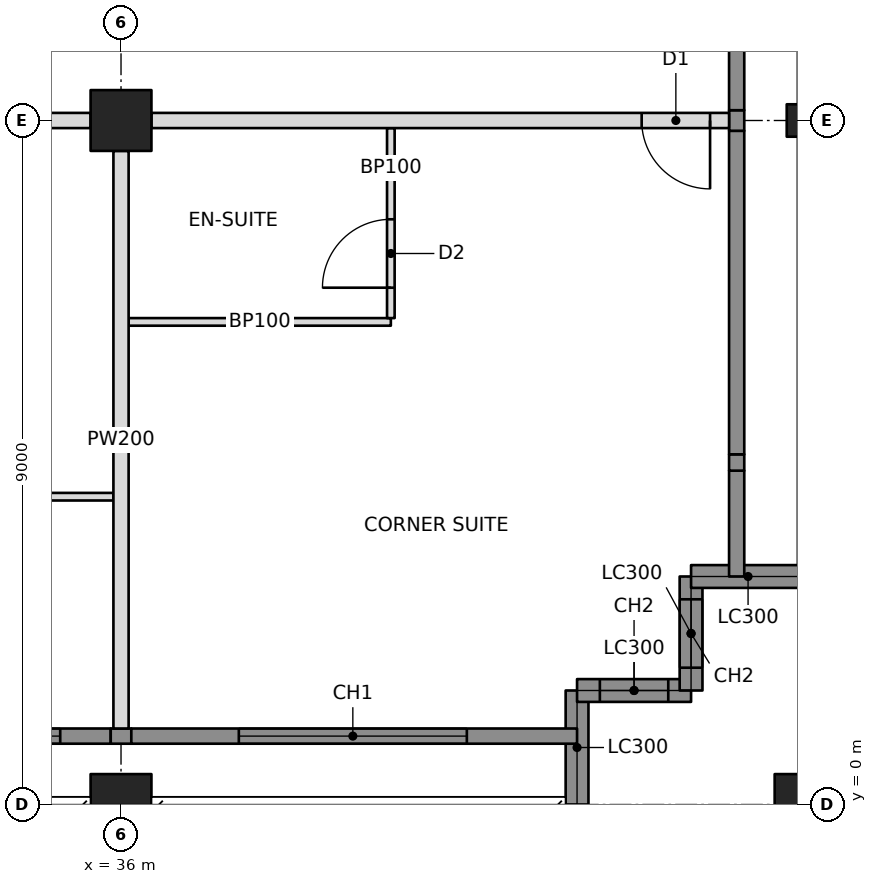
"""IFC4 building model, lengths in metres.
Left out: names, types, materials, properties, quantities, classifications, styles, units other than length and angle.
Written with IfcOpenShell. Run it as: python <this file> out.ifc"""

import sys

from ifc_helpers import new_model, si_unit, direction, frame, frame_2d, origin, origin_2d, place, context, subcontext, project, spatial, rectangle, hollow_rectangle, i_section, extrude, element, fill, save


model = new_model("IFC4")
c1 = context("Model", 3, precision=1e-05, world=origin(), true_north=direction((0.0, 1.0)))
c2 = subcontext(c1, "Body", "Model", "MODEL_VIEW")
j1 = project(units=[si_unit("LENGTHUNIT", "METRE"), si_unit("PLANEANGLEUNIT", "RADIAN")], contexts=[c1])
p1 = place(None, origin())
s1 = spatial("IfcSite", under=j1, at=p1, CompositionType="ELEMENT")
p2 = place(p1, origin())
s2 = spatial("IfcBuilding", under=s1, at=p2, CompositionType="ELEMENT")
p3 = place(p2, frame((0.0, 0.0, 201.2)))
s3 = spatial("IfcBuildingStorey", under=s2, at=p3, CompositionType="ELEMENT", Elevation=201.2)
p4 = place(p3, frame((36.0, 0.0, 0.0), z_axis=(0.0, 0.0, 1.0), x_axis=(1.0, 0.0, 0.0)))
e1 = element("IfcColumn", 1, at=p4, inside=s3, PredefinedType="COLUMN", context=c2, shape_type="SweptSolid", body=[
    extrude(hollow_rectangle(XDim=0.8, YDim=0.8, WallThickness=0.06, at=origin_2d()), origin(), (0.0, 0.0, 1.0), 3.4),
])
p5 = place(p3, frame((36.0, 9.0, 0.0), z_axis=(0.0, 0.0, 1.0), x_axis=(0.0, 1.0, 0.0)))
e2 = element("IfcColumn", 2, at=p5, inside=s3, PredefinedType="COLUMN", context=c2, shape_type="SweptSolid", body=[
    extrude(hollow_rectangle(XDim=0.8, YDim=0.8, WallThickness=0.05, at=origin_2d()), origin(), (0.0, 0.0, 1.0), 3.4),
])
p6 = place(p3, frame((45.0, 0.0, 0.0), z_axis=(0.0, 0.0, 1.0), x_axis=(1.0, 0.0, 0.0)))
e3 = element("IfcColumn", 3, at=p6, inside=s3, PredefinedType="COLUMN", context=c2, shape_type="SweptSolid", body=[
    extrude(hollow_rectangle(XDim=0.8, YDim=0.8, WallThickness=0.06, at=origin_2d()), origin(), (0.0, 0.0, 1.0), 3.4),
])
p7 = place(p3, frame((45.0, 9.0, 0.0), z_axis=(0.0, 0.0, 1.0), x_axis=(0.0, 1.0, 0.0)))
e4 = element("IfcColumn", 4, at=p7, inside=s3, PredefinedType="COLUMN", context=c2, shape_type="SweptSolid", body=[
    extrude(i_section(OverallWidth=0.427, OverallDepth=0.483, WebThickness=0.051, FlangeThickness=0.082, at=origin_2d()), origin(), (0.0, 0.0, 1.0), 3.4),
])
p8 = place(p3, frame((42.0, 0.0, 0.0), z_axis=(0.0, 0.0, 1.0), x_axis=(0.0, 1.0, 0.0)))
e5 = element("IfcWall", 5, at=p8, inside=s3, PredefinedType="SOLIDWALL", context=c2, shape_type="SweptSolid", body=[
    extrude(rectangle(XDim=1.5, YDim=0.3, at=frame_2d((0.75, 0.0))), origin(), (0.0, 0.0, 1.0), 2.42),
])
p9 = place(p3, frame((42.0, 1.5, 0.0), z_axis=(0.0, 0.0, 1.0), x_axis=(1.0, 0.0, 0.0)))
e6 = element("IfcWall", 6, at=p9, inside=s3, PredefinedType="SOLIDWALL", context=c2, shape_type="SweptSolid", body=[
    extrude(rectangle(XDim=1.5, YDim=0.3, at=frame_2d((0.75, 0.0))), origin(), (0.0, 0.0, 1.0), 3.2),
])
p10 = place(p9, frame((0.3, 0.0, 0.6)))
e7 = element("IfcOpeningElement", 7, at=p10, cuts=e6, PredefinedType="OPENING", context=c2, shape_type="SweptSolid", body=[
    extrude(rectangle(XDim=0.9, YDim=2.2, at=frame_2d((0.45, 1.1))), frame((0.0, 0.16, 0.0), z_axis=(0.0, -1.0, 0.0), x_axis=(1.0, 0.0, 0.0)), (0.0, 0.0, 1.0), 0.32),
])
p11 = place(p3, frame((43.5, 1.5, 0.0), z_axis=(0.0, 0.0, 1.0), x_axis=(0.0, 1.0, 0.0)))
e8 = element("IfcWall", 8, at=p11, inside=s3, PredefinedType="SOLIDWALL", context=c2, shape_type="SweptSolid", body=[
    extrude(rectangle(XDim=1.5, YDim=0.3, at=frame_2d((0.75, 0.0))), origin(), (0.0, 0.0, 1.0), 3.2),
])
p12 = place(p11, frame((0.3, 0.0, 0.6)))
e9 = element("IfcOpeningElement", 9, at=p12, cuts=e8, PredefinedType="OPENING", context=c2, shape_type="SweptSolid", body=[
    extrude(rectangle(XDim=0.9, YDim=2.2, at=frame_2d((0.45, 1.1))), frame((0.0, 0.16, 0.0), z_axis=(0.0, -1.0, 0.0), x_axis=(1.0, 0.0, 0.0)), (0.0, 0.0, 1.0), 0.32),
])
p13 = place(p3, frame((43.5, 3.0, 0.0), z_axis=(0.0, 0.0, 1.0), x_axis=(1.0, 0.0, 0.0)))
e10 = element("IfcWall", 10, at=p13, inside=s3, PredefinedType="SOLIDWALL", context=c2, shape_type="SweptSolid", body=[
    extrude(rectangle(XDim=1.5, YDim=0.3, at=frame_2d((0.75, 0.0))), origin(), (0.0, 0.0, 1.0), 2.42),
])
p14 = place(p3, frame((44.1, 3.0, 0.0), z_axis=(0.0, 0.0, 1.0), x_axis=(0.0, 1.0, 0.0)))
e11 = element("IfcWall", 11, at=p14, inside=s3, PredefinedType="SOLIDWALL", context=c2, shape_type="SweptSolid", body=[
    extrude(rectangle(XDim=1.393, YDim=0.2, at=frame_2d((0.696, 0.0))), origin(), (0.0, 0.0, 1.0), 3.2),
])
p15 = place(p3, frame((27.4, 9.0, 0.0), z_axis=(0.0, 0.0, 1.0), x_axis=(1.0, 0.0, 0.0)))
e12 = element("IfcWall", 12, at=p15, inside=s3, PredefinedType="PARTITIONING", context=c2, shape_type="SweptSolid", body=[
    extrude(rectangle(XDim=8.2, YDim=0.2, at=frame_2d((4.1, 0.0))), origin(), (0.0, 0.0, 1.0), 2.405),
])
p16 = place(p15, frame((0.15, 0.0, 0.0)))
e13 = element("IfcOpeningElement", 13, at=p16, cuts=e12, PredefinedType="OPENING", context=c2, shape_type="SweptSolid", body=[
    extrude(rectangle(XDim=0.9, YDim=2.1, at=frame_2d((0.45, 1.05))), frame((0.0, 0.11, 0.0), z_axis=(0.0, -1.0, 0.0), x_axis=(1.0, 0.0, 0.0)), (0.0, 0.0, 1.0), 0.22),
])
p17 = place(p3, frame((36.4, 9.0, 0.0), z_axis=(0.0, 0.0, 1.0), x_axis=(1.0, 0.0, 0.0)))
e14 = element("IfcWall", 14, at=p17, inside=s3, PredefinedType="PARTITIONING", context=c2, shape_type="SweptSolid", body=[
    extrude(rectangle(XDim=7.6, YDim=0.2, at=frame_2d((3.8, 0.0))), origin(), (0.0, 0.0, 1.0), 2.438),
])
p18 = place(p17, frame((6.45, 0.0, 0.0)))
e15 = element("IfcOpeningElement", 15, at=p18, cuts=e14, PredefinedType="OPENING", context=c2, shape_type="SweptSolid", body=[
    extrude(rectangle(XDim=0.9, YDim=2.1, at=frame_2d((0.45, 1.05))), frame((0.0, 0.11, 0.0), z_axis=(0.0, -1.0, 0.0), x_axis=(1.0, 0.0, 0.0)), (0.0, 0.0, 1.0), 0.22),
])
p19 = place(p3, frame((36.0, 8.6, 0.0), z_axis=(0.0, 0.0, 1.0), x_axis=(0.0, -1.0, 0.0)))
e16 = element("IfcWall", 16, at=p19, inside=s3, PredefinedType="PARTITIONING", context=c2, shape_type="SweptSolid", body=[
    extrude(rectangle(XDim=7.6, YDim=0.2, at=frame_2d((3.8, 0.0))), origin(), (0.0, 0.0, 1.0), 2.438),
])
p20 = place(p3, frame((31.5, 4.05, 0.0), z_axis=(0.0, 0.0, 1.0), x_axis=(1.0, 0.0, 0.0)))
e17 = element("IfcWall", 17, at=p20, inside=s3, PredefinedType="PARTITIONING", context=c2, shape_type="SweptSolid", body=[
    extrude(rectangle(XDim=4.4, YDim=0.1, at=frame_2d((2.2, 0.0))), origin(), (0.0, 0.0, 1.0), 2.438),
])
p21 = place(p20, frame((0.5, 0.0, 0.0)))
e18 = element("IfcOpeningElement", 18, at=p21, cuts=e17, PredefinedType="OPENING", context=c2, shape_type="SweptSolid", body=[
    extrude(rectangle(XDim=0.9, YDim=2.1, at=frame_2d((0.45, 1.05))), frame((0.0, 0.06, 0.0), z_axis=(0.0, -1.0, 0.0), x_axis=(1.0, 0.0, 0.0)), (0.0, 0.0, 1.0), 0.12),
])
p22 = place(p3, frame((36.1, 6.35, 0.0), z_axis=(0.0, 0.0, 1.0), x_axis=(1.0, 0.0, 0.0)))
e19 = element("IfcWall", 19, at=p22, inside=s3, PredefinedType="PARTITIONING", context=c2, shape_type="SweptSolid", body=[
    extrude(rectangle(XDim=3.45, YDim=0.1, at=frame_2d((1.725, 0.0))), origin(), (0.0, 0.0, 1.0), 2.438),
])
p23 = place(p3, frame((39.55, 8.9, 0.0), z_axis=(0.0, 0.0, 1.0), x_axis=(0.0, -1.0, 0.0)))
e20 = element("IfcWall", 20, at=p23, inside=s3, PredefinedType="PARTITIONING", context=c2, shape_type="SweptSolid", body=[
    extrude(rectangle(XDim=2.5, YDim=0.1, at=frame_2d((1.25, 0.0))), origin(), (0.0, 0.0, 1.0), 2.438),
])
p24 = place(p23, frame((1.2, 0.0, 0.0)))
e21 = element("IfcOpeningElement", 21, at=p24, cuts=e20, PredefinedType="OPENING", context=c2, shape_type="SweptSolid", body=[
    extrude(rectangle(XDim=0.9, YDim=2.1, at=frame_2d((0.45, 1.05))), frame((0.0, 0.06, 0.0), z_axis=(0.0, -1.0, 0.0), x_axis=(1.0, 0.0, 0.0)), (0.0, 0.0, 1.0), 0.12),
])
p25 = place(p3, frame((27.194, 0.9, 0.0), z_axis=(0.0, 0.0, 1.0), x_axis=(1.0, 0.0, 0.0)))
e22 = element("IfcWall", 22, at=p25, inside=s3, PredefinedType="SOLIDWALL", context=c2, shape_type="SweptSolid", body=[
    extrude(rectangle(XDim=8.671, YDim=0.2, at=frame_2d((4.335, 0.0))), origin(), (0.0, 0.0, 1.0), 3.2),
])
p26 = place(p25, frame((0.606, 0.0, 0.6)))
e23 = element("IfcOpeningElement", 23, at=p26, cuts=e22, PredefinedType="OPENING", context=c2, shape_type="SweptSolid", body=[
    extrude(rectangle(XDim=3.0, YDim=2.2, at=frame_2d((1.5, 1.1))), frame((0.0, 0.11, 0.0), z_axis=(0.0, -1.0, 0.0), x_axis=(1.0, 0.0, 0.0)), (0.0, 0.0, 1.0), 0.22),
])
p27 = place(p25, frame((5.006, 0.0, 0.6)))
e24 = element("IfcOpeningElement", 24, at=p27, cuts=e22, PredefinedType="OPENING", context=c2, shape_type="SweptSolid", body=[
    extrude(rectangle(XDim=3.0, YDim=2.2, at=frame_2d((1.5, 1.1))), frame((0.0, 0.11, 0.0), z_axis=(0.0, -1.0, 0.0), x_axis=(1.0, 0.0, 0.0)), (0.0, 0.0, 1.0), 0.22),
])
p28 = place(p3, frame((35.865, 0.9, 0.0), z_axis=(0.0, 0.0, 1.0), x_axis=(1.0, 0.0, 0.0)))
e25 = element("IfcWall", 25, at=p28, inside=s3, PredefinedType="SOLIDWALL", context=c2, shape_type="SweptSolid", body=[
    extrude(rectangle(XDim=0.271, YDim=0.2, at=frame_2d((0.135, 0.0))), origin(), (0.0, 0.0, 1.0), 2.438),
])
p29 = place(p3, frame((36.135, 0.9, 0.0), z_axis=(0.0, 0.0, 1.0), x_axis=(1.0, 0.0, 0.0)))
e26 = element("IfcWall", 26, at=p29, inside=s3, PredefinedType="SOLIDWALL", context=c2, shape_type="SweptSolid", body=[
    extrude(rectangle(XDim=5.865, YDim=0.2, at=frame_2d((2.932, 0.0))), origin(), (0.0, 0.0, 1.0), 3.2),
])
p30 = place(p29, frame((1.415, 0.0, 0.6)))
e27 = element("IfcOpeningElement", 27, at=p30, cuts=e26, PredefinedType="OPENING", context=c2, shape_type="SweptSolid", body=[
    extrude(rectangle(XDim=3.0, YDim=2.2, at=frame_2d((1.5, 1.1))), frame((0.0, 0.11, 0.0), z_axis=(0.0, -1.0, 0.0), x_axis=(1.0, 0.0, 0.0)), (0.0, 0.0, 1.0), 0.22),
])
p31 = place(p3, frame((44.1, 4.393, 0.0), z_axis=(0.0, 0.0, 1.0), x_axis=(0.0, 1.0, 0.0)))
e28 = element("IfcWall", 28, at=p31, inside=s3, PredefinedType="SOLIDWALL", context=c2, shape_type="SweptSolid", body=[
    extrude(rectangle(XDim=0.215, YDim=0.2, at=frame_2d((0.107, 0.0))), origin(), (0.0, 0.0, 1.0), 2.661),
])
p32 = place(p3, frame((44.1, 4.607, 0.0), z_axis=(0.0, 0.0, 1.0), x_axis=(0.0, 1.0, 0.0)))
e29 = element("IfcWall", 29, at=p32, inside=s3, PredefinedType="SOLIDWALL", context=c2, shape_type="SweptSolid", body=[
    extrude(rectangle(XDim=4.257, YDim=0.2, at=frame_2d((2.129, 0.0))), origin(), (0.0, 0.0, 1.0), 3.2),
])
p33 = place(p3, frame((44.1, 8.865, 0.0), z_axis=(0.0, 0.0, 1.0), x_axis=(0.0, 1.0, 0.0)))
e30 = element("IfcWall", 30, at=p33, inside=s3, PredefinedType="SOLIDWALL", context=c2, shape_type="SweptSolid", body=[
    extrude(rectangle(XDim=0.271, YDim=0.2, at=frame_2d((0.135, 0.0))), origin(), (0.0, 0.0, 1.0), 2.438),
])
p34 = place(p3, frame((44.1, 9.135, 0.0), z_axis=(0.0, 0.0, 1.0), x_axis=(0.0, 1.0, 0.0)))
e31 = element("IfcWall", 31, at=p34, inside=s3, PredefinedType="SOLIDWALL", context=c2, shape_type="SweptSolid", body=[
    extrude(rectangle(XDim=8.671, YDim=0.2, at=frame_2d((4.335, 0.0))), origin(), (0.0, 0.0, 1.0), 3.2),
])
p35 = place(p34, frame((2.015, 0.0, 0.6)))
e32 = element("IfcOpeningElement", 32, at=p35, cuts=e31, PredefinedType="OPENING", context=c2, shape_type="SweptSolid", body=[
    extrude(rectangle(XDim=3.0, YDim=2.2, at=frame_2d((1.5, 1.1))), frame((0.0, 0.11, 0.0), z_axis=(0.0, -1.0, 0.0), x_axis=(1.0, 0.0, 0.0)), (0.0, 0.0, 1.0), 0.22),
])
p36 = place(p34, frame((5.515, 0.0, 0.6)))
e33 = element("IfcOpeningElement", 33, at=p36, cuts=e31, PredefinedType="OPENING", context=c2, shape_type="SweptSolid", body=[
    extrude(rectangle(XDim=3.0, YDim=2.2, at=frame_2d((1.5, 1.1))), frame((0.0, 0.11, 0.0), z_axis=(0.0, -1.0, 0.0), x_axis=(1.0, 0.0, 0.0)), (0.0, 0.0, 1.0), 0.22),
])
p37 = place(p10, origin())
e34 = element("IfcWindow", 34, at=p37, inside=s3, PartitioningType="SINGLE_PANEL", PredefinedType="WINDOW", context=c2, shape_type="SweptSolid", body=[
    extrude(rectangle(XDim=0.9, YDim=2.2, at=frame_2d((0.45, 1.1))), frame((0.0, 0.03, 0.0), z_axis=(0.0, -1.0, 0.0), x_axis=(1.0, 0.0, 0.0)), (0.0, 0.0, 1.0), 0.06),
])
fill(e7, e34)
p38 = place(p12, origin())
e35 = element("IfcWindow", 35, at=p38, inside=s3, PartitioningType="SINGLE_PANEL", PredefinedType="WINDOW", context=c2, shape_type="SweptSolid", body=[
    extrude(rectangle(XDim=0.9, YDim=2.2, at=frame_2d((0.45, 1.1))), frame((0.0, 0.03, 0.0), z_axis=(0.0, -1.0, 0.0), x_axis=(1.0, 0.0, 0.0)), (0.0, 0.0, 1.0), 0.06),
])
fill(e9, e35)
p39 = place(p27, origin())
e36 = element("IfcWindow", 36, at=p39, inside=s3, PartitioningType="TRIPLE_PANEL_VERTICAL", PredefinedType="WINDOW", context=c2, shape_type="SweptSolid", body=[
    extrude(rectangle(XDim=3.0, YDim=2.2, at=frame_2d((1.5, 1.1))), frame((0.0, 0.03, 0.0), z_axis=(0.0, -1.0, 0.0), x_axis=(1.0, 0.0, 0.0)), (0.0, 0.0, 1.0), 0.06),
])
fill(e24, e36)
p40 = place(p30, origin())
e37 = element("IfcWindow", 37, at=p40, inside=s3, PartitioningType="TRIPLE_PANEL_VERTICAL", PredefinedType="WINDOW", context=c2, shape_type="SweptSolid", body=[
    extrude(rectangle(XDim=3.0, YDim=2.2, at=frame_2d((1.5, 1.1))), frame((0.0, 0.03, 0.0), z_axis=(0.0, -1.0, 0.0), x_axis=(1.0, 0.0, 0.0)), (0.0, 0.0, 1.0), 0.06),
])
fill(e27, e37)
p41 = place(p24, frame((0.9, 0.0, 0.0), z_axis=(0.0, 0.0, 1.0), x_axis=(-1.0, 0.0, 0.0)))
e38 = element("IfcDoor", 38, at=p41, inside=s3, OperationType="SINGLE_SWING_LEFT", PredefinedType="DOOR", context=c2, shape_type="SweptSolid", body=[
    extrude(rectangle(XDim=0.9, YDim=2.1, at=frame_2d((0.45, 1.05))), frame((0.0, 0.025, 0.0), z_axis=(0.0, -1.0, 0.0), x_axis=(1.0, 0.0, 0.0)), (0.0, 0.0, 1.0), 0.05),
])
fill(e21, e38)
p42 = place(p18, frame((0.9, 0.0, 0.0), z_axis=(0.0, 0.0, 1.0), x_axis=(-1.0, 0.0, 0.0)))
e39 = element("IfcDoor", 39, at=p42, inside=s3, OperationType="SINGLE_SWING_LEFT", PredefinedType="DOOR", context=c2, shape_type="SweptSolid", body=[
    extrude(rectangle(XDim=0.9, YDim=2.1, at=frame_2d((0.45, 1.05))), frame((0.0, 0.025, 0.0), z_axis=(0.0, -1.0, 0.0), x_axis=(1.0, 0.0, 0.0)), (0.0, 0.0, 1.0), 0.05),
])
fill(e15, e39)
save(model, sys.argv[1])
